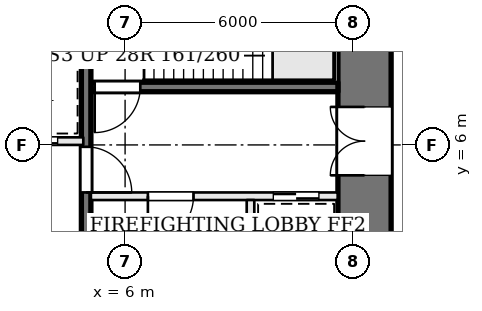
"""IFC4 building model, lengths in metres.
Left out: names, types, materials, properties, quantities, classifications, styles, units other than length and angle.
Written with IfcOpenShell. Run it as: python <this file> out.ifc"""

import sys

from ifc_helpers import new_model, si_unit, direction, frame, frame_2d, origin, place, context, subcontext, project, spatial, rectangle, extrude, element, fill, save


model = new_model("IFC4")
c1 = context("Model", 3, precision=1e-05, world=origin(), true_north=direction((0.0, 1.0)))
c2 = subcontext(c1, "Body", "Model", "MODEL_VIEW")
j1 = project(units=[si_unit("LENGTHUNIT", "METRE"), si_unit("PLANEANGLEUNIT", "RADIAN")], contexts=[c1])
p1 = place(None, origin())
s1 = spatial("IfcSite", under=j1, at=p1, CompositionType="ELEMENT")
p2 = place(p1, origin())
s2 = spatial("IfcBuilding", under=s1, at=p2, CompositionType="ELEMENT")
p3 = place(p2, frame((0.0, 0.0, -10.5)))
s3 = spatial("IfcBuildingStorey", under=s2, at=p3, CompositionType="ELEMENT", Elevation=-10.5)
p4 = place(p3, frame((12.3, -1.6, 0.0), z_axis=(0.0, 0.0, 1.0), x_axis=(0.0, 1.0, 0.0)))
e1 = element("IfcWall", 1, at=p4, inside=s3, PredefinedType="SHEAR", context=c2, shape_type="SweptSolid", body=[
    extrude(rectangle(XDim=12.2, YDim=1.4, at=frame_2d((6.1, 0.0))), origin(), (0.0, 0.0, 1.0), 4.5),
])
p5 = place(p4, frame((6.8, 0.0, 0.0)))
e2 = element("IfcOpeningElement", 2, at=p5, cuts=e1, PredefinedType="OPENING", context=c2, shape_type="SweptSolid", body=[
    extrude(rectangle(XDim=1.8, YDim=2.1, at=frame_2d((0.9, 1.05))), frame((0.0, 0.71, 0.0), z_axis=(0.0, -1.0, 0.0), x_axis=(1.0, 0.0, 0.0)), (0.0, 0.0, 1.0), 1.42),
])
p6 = place(p3, frame((11.6, 7.525, 0.0), z_axis=(0.0, 0.0, 1.0), x_axis=(-1.0, 0.0, 0.0)))
e3 = element("IfcWall", 3, at=p6, inside=s3, PredefinedType="SOLIDWALL", context=c2, shape_type="SweptSolid", body=[
    extrude(rectangle(XDim=6.5, YDim=0.25, at=frame_2d((3.25, 0.0))), origin(), (0.0, 0.0, 1.0), 4.2),
])
p7 = place(p6, frame((5.2, 0.0, 0.0)))
e4 = element("IfcOpeningElement", 4, at=p7, cuts=e3, PredefinedType="OPENING", context=c2, shape_type="SweptSolid", body=[
    extrude(rectangle(XDim=1.2, YDim=2.1, at=frame_2d((0.6, 1.05))), frame((0.0, 0.135, 0.0), z_axis=(0.0, -1.0, 0.0), x_axis=(1.0, 0.0, 0.0)), (0.0, 0.0, 1.0), 0.27),
])
p8 = place(p3, frame((11.6, 4.65, 0.0), z_axis=(0.0, 0.0, 1.0), x_axis=(-1.0, 0.0, 0.0)))
e5 = element("IfcWall", 5, at=p8, inside=s3, PredefinedType="SOLIDWALL", context=c2, shape_type="SweptSolid", body=[
    extrude(rectangle(XDim=6.5, YDim=0.2, at=frame_2d((3.25, 0.0))), origin(), (0.0, 0.0, 1.0), 4.2),
])
p9 = place(p8, frame((3.8, 0.0, 0.0)))
e6 = element("IfcOpeningElement", 6, at=p9, cuts=e5, PredefinedType="OPENING", context=c2, shape_type="SweptSolid", body=[
    extrude(rectangle(XDim=1.2, YDim=2.1, at=frame_2d((0.6, 1.05))), frame((0.0, 0.11, 0.0), z_axis=(0.0, -1.0, 0.0), x_axis=(1.0, 0.0, 0.0)), (0.0, 0.0, 1.0), 0.22),
])
p10 = place(p8, frame((0.5, 0.0, 0.0)))
e7 = element("IfcOpeningElement", 7, at=p10, cuts=e5, PredefinedType="OPENING", context=c2, shape_type="SweptSolid", body=[
    extrude(rectangle(XDim=1.2, YDim=2.1, at=frame_2d((0.6, 1.05))), frame((0.0, 0.11, 0.0), z_axis=(0.0, -1.0, 0.0), x_axis=(1.0, 0.0, 0.0)), (0.0, 0.0, 1.0), 0.22),
])
p11 = place(p3, frame((9.3, 4.55, 0.0), z_axis=(0.0, 0.0, 1.0), x_axis=(0.0, -1.0, 0.0)))
e8 = element("IfcWall", 8, at=p11, inside=s3, PredefinedType="SOLIDWALL", context=c2, shape_type="SweptSolid", body=[
    extrude(rectangle(XDim=3.0, YDim=0.2, at=frame_2d((1.5, 0.0))), origin(), (0.0, 0.0, 1.0), 4.2),
])
p12 = place(p3, frame((4.975, 10.6, 0.0), z_axis=(0.0, 0.0, 1.0), x_axis=(0.0, -1.0, 0.0)))
e9 = element("IfcWall", 9, at=p12, inside=s3, PredefinedType="SOLIDWALL", context=c2, shape_type="SweptSolid", body=[
    extrude(rectangle(XDim=12.2, YDim=0.25, at=frame_2d((6.1, 0.0))), origin(), (0.0, 0.0, 1.0), 4.2),
])
p13 = place(p12, frame((4.65, 0.0, 0.0)))
e10 = element("IfcOpeningElement", 10, at=p13, cuts=e9, PredefinedType="OPENING", context=c2, shape_type="SweptSolid", body=[
    extrude(rectangle(XDim=1.2, YDim=2.1, at=frame_2d((0.6, 1.05))), frame((0.0, 0.135, 0.0), z_axis=(0.0, -1.0, 0.0), x_axis=(1.0, 0.0, 0.0)), (0.0, 0.0, 1.0), 0.27),
])
p14 = place(p3, frame((-4.9, 6.1, 0.0), z_axis=(0.0, 0.0, 1.0), x_axis=(1.0, 0.0, 0.0)))
e11 = element("IfcWall", 11, at=p14, inside=s3, PredefinedType="SOLIDWALL", context=c2, shape_type="SweptSolid", body=[
    extrude(rectangle(XDim=9.8, YDim=0.2, at=frame_2d((4.9, 0.0))), origin(), (0.0, 0.0, 1.0), 4.2),
])
p15 = place(p14, frame((0.675, 0.0, 0.0)))
e12 = element("IfcOpeningElement", 12, at=p15, cuts=e11, PredefinedType="OPENING", context=c2, shape_type="SweptSolid", body=[
    extrude(rectangle(XDim=1.1, YDim=2.1, at=frame_2d((0.55, 1.05))), frame((0.0, 0.11, 0.0), z_axis=(0.0, -1.0, 0.0), x_axis=(1.0, 0.0, 0.0)), (0.0, 0.0, 1.0), 0.22),
])
p16 = place(p14, frame((3.125, 0.0, 0.0)))
e13 = element("IfcOpeningElement", 13, at=p16, cuts=e11, PredefinedType="OPENING", context=c2, shape_type="SweptSolid", body=[
    extrude(rectangle(XDim=1.1, YDim=2.1, at=frame_2d((0.55, 1.05))), frame((0.0, 0.11, 0.0), z_axis=(0.0, -1.0, 0.0), x_axis=(1.0, 0.0, 0.0)), (0.0, 0.0, 1.0), 0.22),
])
p17 = place(p14, frame((5.575, 0.0, 0.0)))
e14 = element("IfcOpeningElement", 14, at=p17, cuts=e11, PredefinedType="OPENING", context=c2, shape_type="SweptSolid", body=[
    extrude(rectangle(XDim=1.1, YDim=2.1, at=frame_2d((0.55, 1.05))), frame((0.0, 0.11, 0.0), z_axis=(0.0, -1.0, 0.0), x_axis=(1.0, 0.0, 0.0)), (0.0, 0.0, 1.0), 0.22),
])
p18 = place(p14, frame((8.025, 0.0, 0.0)))
e15 = element("IfcOpeningElement", 15, at=p18, cuts=e11, PredefinedType="OPENING", context=c2, shape_type="SweptSolid", body=[
    extrude(rectangle(XDim=1.1, YDim=2.1, at=frame_2d((0.55, 1.05))), frame((0.0, 0.11, 0.0), z_axis=(0.0, -1.0, 0.0), x_axis=(1.0, 0.0, 0.0)), (0.0, 0.0, 1.0), 0.22),
])
p19 = place(p3, frame((-4.9, 8.5, 0.0), z_axis=(0.0, 0.0, 1.0), x_axis=(1.0, 0.0, 0.0)))
e16 = element("IfcWall", 16, at=p19, inside=s3, PredefinedType="SOLIDWALL", context=c2, shape_type="SweptSolid", body=[
    extrude(rectangle(XDim=9.8, YDim=0.2, at=frame_2d((4.9, 0.0))), origin(), (0.0, 0.0, 1.0), 4.2),
])
p20 = place(p5, origin())
e17 = element("IfcDoor", 17, at=p20, inside=s3, OperationType="DOUBLE_DOOR_SINGLE_SWING", PredefinedType="DOOR", context=c2, shape_type="SweptSolid", body=[
    extrude(rectangle(XDim=1.8, YDim=2.1, at=frame_2d((0.9, 1.05))), frame((0.0, 0.025, 0.0), z_axis=(0.0, -1.0, 0.0), x_axis=(1.0, 0.0, 0.0)), (0.0, 0.0, 1.0), 0.05),
])
fill(e2, e17)
p21 = place(p13, origin())
e18 = element("IfcDoor", 18, at=p21, inside=s3, OperationType="SINGLE_SWING_RIGHT", PredefinedType="DOOR", context=c2, shape_type="SweptSolid", body=[
    extrude(rectangle(XDim=1.2, YDim=2.1, at=frame_2d((0.6, 1.05))), frame((0.0, 0.025, 0.0), z_axis=(0.0, -1.0, 0.0), x_axis=(1.0, 0.0, 0.0)), (0.0, 0.0, 1.0), 0.05),
])
fill(e10, e18)
p22 = place(p9, origin())
e19 = element("IfcDoor", 19, at=p22, inside=s3, OperationType="SINGLE_SWING_RIGHT", PredefinedType="DOOR", context=c2, shape_type="SweptSolid", body=[
    extrude(rectangle(XDim=1.2, YDim=2.1, at=frame_2d((0.6, 1.05))), frame((0.0, 0.025, 0.0), z_axis=(0.0, -1.0, 0.0), x_axis=(1.0, 0.0, 0.0)), (0.0, 0.0, 1.0), 0.05),
])
fill(e6, e19)
p23 = place(p7, origin())
e20 = element("IfcDoor", 20, at=p23, inside=s3, OperationType="SINGLE_SWING_RIGHT", PredefinedType="DOOR", context=c2, shape_type="SweptSolid", body=[
    extrude(rectangle(XDim=1.2, YDim=2.1, at=frame_2d((0.6, 1.05))), frame((0.0, 0.025, 0.0), z_axis=(0.0, -1.0, 0.0), x_axis=(1.0, 0.0, 0.0)), (0.0, 0.0, 1.0), 0.05),
])
fill(e4, e20)
p24 = place(p10, origin())
e21 = element("IfcDoor", 21, at=p24, inside=s3, OperationType="SLIDING_TO_RIGHT", PredefinedType="DOOR", context=c2, shape_type="SweptSolid", body=[
    extrude(rectangle(XDim=1.2, YDim=2.1, at=frame_2d((0.6, 1.05))), frame((0.0, 0.025, 0.0), z_axis=(0.0, -1.0, 0.0), x_axis=(1.0, 0.0, 0.0)), (0.0, 0.0, 1.0), 0.05),
])
fill(e7, e21)
p25 = place(p18, origin())
e22 = element("IfcDoor", 22, at=p25, inside=s3, OperationType="SLIDING_TO_LEFT", PredefinedType="DOOR", context=c2, shape_type="SweptSolid", body=[
    extrude(rectangle(XDim=1.1, YDim=2.1, at=frame_2d((0.55, 1.05))), frame((0.0, 0.025, 0.0), z_axis=(0.0, -1.0, 0.0), x_axis=(1.0, 0.0, 0.0)), (0.0, 0.0, 1.0), 0.05),
])
fill(e15, e22)
save(model, sys.argv[1])
